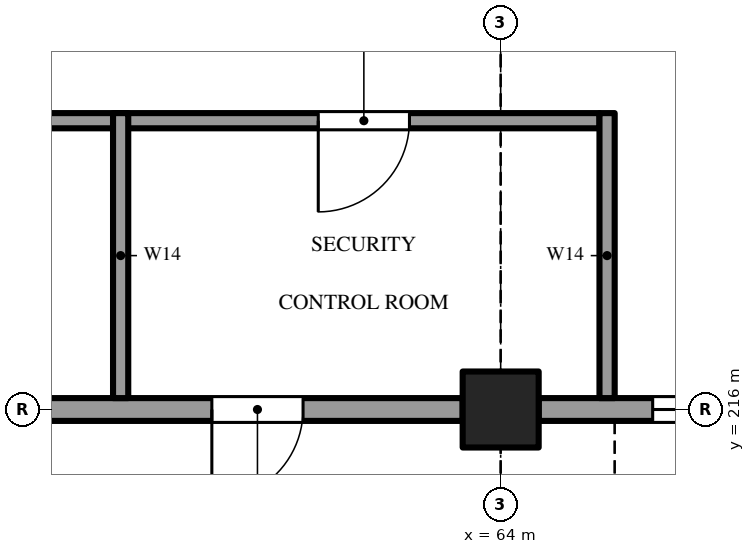
"""IFC4 building model, lengths in metres.
Left out: names, types, materials, properties, quantities, classifications, styles, units other than length and angle.
Written with IfcOpenShell. Run it as: python <this file> out.ifc"""

import sys

from ifc_helpers import new_model, si_unit, direction, frame, frame_2d, origin, origin_2d, place, context, subcontext, project, spatial, rectangle, extrude, element, fill, save


model = new_model("IFC4")
c1 = context("Model", 3, precision=1e-05, world=origin(), true_north=direction((0.0, 1.0)))
c2 = subcontext(c1, "Body", "Model", "MODEL_VIEW")
j1 = project(units=[si_unit("LENGTHUNIT", "METRE"), si_unit("PLANEANGLEUNIT", "RADIAN")], contexts=[c1])
p1 = place(None, origin())
s1 = spatial("IfcSite", under=j1, at=p1, CompositionType="ELEMENT")
p2 = place(p1, origin())
s2 = spatial("IfcBuilding", under=s1, at=p2, CompositionType="ELEMENT")
p3 = place(p2, origin())
s3 = spatial("IfcBuildingStorey", under=s2, at=p3, CompositionType="ELEMENT", Elevation=0.0)
p4 = place(p3, frame((64.0, 216.0, -0.4), z_axis=(0.0, 0.0, 1.0), x_axis=(1.0, 0.0, 0.0)))
e1 = element("IfcColumn", 1, at=p4, inside=s3, PredefinedType="COLUMN", context=c2, shape_type="SweptSolid", body=[
    extrude(rectangle(XDim=1.0, YDim=1.0, at=origin_2d()), origin(), (0.0, 0.0, 1.0), 7.6),
])
p5 = place(p3, frame((46.5, 216.0, 0.0), z_axis=(0.0, 0.0, 1.0), x_axis=(1.0, 0.0, 0.0)))
e2 = element("IfcWall", 2, at=p5, inside=s3, PredefinedType="SOLIDWALL", context=c2, shape_type="SweptSolid", body=[
    extrude(rectangle(XDim=17.0, YDim=0.3, at=frame_2d((8.5, 0.0))), origin(), (0.0, 0.0, 1.0), 6.8),
])
p6 = place(p5, frame((1.0, 0.0, 0.0)))
e3 = element("IfcOpeningElement", 3, at=p6, cuts=e2, PredefinedType="OPENING", context=c2, shape_type="SweptSolid", body=[
    extrude(rectangle(XDim=1.0, YDim=2.2, at=frame_2d((0.5, 1.1))), frame((0.0, 0.16, 0.0), z_axis=(0.0, -1.0, 0.0), x_axis=(1.0, 0.0, 0.0)), (0.0, 0.0, 1.0), 0.32),
])
p7 = place(p5, frame((13.7, 0.0, 0.0)))
e4 = element("IfcOpeningElement", 4, at=p7, cuts=e2, PredefinedType="OPENING", context=c2, shape_type="SweptSolid", body=[
    extrude(rectangle(XDim=1.2, YDim=2.2, at=frame_2d((0.6, 1.1))), frame((0.0, 0.16, 0.0), z_axis=(0.0, -1.0, 0.0), x_axis=(1.0, 0.0, 0.0)), (0.0, 0.0, 1.0), 0.32),
])
p8 = place(p3, frame((64.5, 216.0, 0.0), z_axis=(0.0, 0.0, 1.0), x_axis=(1.0, 0.0, 0.0)))
e5 = element("IfcWall", 5, at=p8, inside=s3, PredefinedType="SOLIDWALL", context=c2, shape_type="SweptSolid", body=[
    extrude(rectangle(XDim=17.0, YDim=0.3, at=frame_2d((8.5, 0.0))), origin(), (0.0, 0.0, 1.0), 6.8),
])
p9 = place(p8, frame((13.4, 0.0, 0.0)))
e6 = element("IfcOpeningElement", 6, at=p9, cuts=e5, PredefinedType="OPENING", context=c2, shape_type="SweptSolid", body=[
    extrude(rectangle(XDim=1.8, YDim=2.4, at=frame_2d((0.9, 1.2))), frame((0.0, 0.16, 0.0), z_axis=(0.0, -1.0, 0.0), x_axis=(1.0, 0.0, 0.0)), (0.0, 0.0, 1.0), 0.32),
])
p10 = place(p8, frame((1.5, 0.0, 0.0)))
e7 = element("IfcOpeningElement", 7, at=p10, cuts=e5, PredefinedType="OPENING", context=c2, shape_type="SweptSolid", body=[
    extrude(rectangle(XDim=5.0, YDim=5.5, at=frame_2d((2.5, 2.75))), frame((0.0, 0.16, 0.0), z_axis=(0.0, -1.0, 0.0), x_axis=(1.0, 0.0, 0.0)), (0.0, 0.0, 1.0), 0.32),
])
p11 = place(p8, frame((9.5, 0.0, 0.0)))
e8 = element("IfcOpeningElement", 8, at=p11, cuts=e5, PredefinedType="OPENING", context=c2, shape_type="SweptSolid", body=[
    extrude(rectangle(XDim=2.4, YDim=2.4, at=frame_2d((1.2, 1.2))), frame((0.0, 0.16, 0.0), z_axis=(0.0, -1.0, 0.0), x_axis=(1.0, 0.0, 0.0)), (0.0, 0.0, 1.0), 0.32),
])
p12 = place(p3, frame((28.175, 219.8, 0.0), z_axis=(0.0, 0.0, 1.0), x_axis=(1.0, 0.0, 0.0)))
e9 = element("IfcWall", 9, at=p12, inside=s3, PredefinedType="SOLIDWALL", context=c2, shape_type="SweptSolid", body=[
    extrude(rectangle(XDim=37.125, YDim=0.2, at=frame_2d((18.562, 0.0))), origin(), (0.0, 0.0, 1.0), 6.8),
])
p13 = place(p12, frame((22.825, 0.0, 0.0)))
e10 = element("IfcOpeningElement", 10, at=p13, cuts=e9, PredefinedType="OPENING", context=c2, shape_type="SweptSolid", body=[
    extrude(rectangle(XDim=1.0, YDim=2.1, at=frame_2d((0.5, 1.05))), frame((0.0, 0.11, 0.0), z_axis=(0.0, -1.0, 0.0), x_axis=(1.0, 0.0, 0.0)), (0.0, 0.0, 1.0), 0.22),
])
p14 = place(p12, frame((27.425, 0.0, 0.0)))
e11 = element("IfcOpeningElement", 11, at=p14, cuts=e9, PredefinedType="OPENING", context=c2, shape_type="SweptSolid", body=[
    extrude(rectangle(XDim=1.2, YDim=2.1, at=frame_2d((0.6, 1.05))), frame((0.0, 0.11, 0.0), z_axis=(0.0, -1.0, 0.0), x_axis=(1.0, 0.0, 0.0)), (0.0, 0.0, 1.0), 0.22),
])
p15 = place(p12, frame((33.425, 0.0, 0.0)))
e12 = element("IfcOpeningElement", 12, at=p15, cuts=e9, PredefinedType="OPENING", context=c2, shape_type="SweptSolid", body=[
    extrude(rectangle(XDim=1.2, YDim=2.1, at=frame_2d((0.6, 1.05))), frame((0.0, 0.11, 0.0), z_axis=(0.0, -1.0, 0.0), x_axis=(1.0, 0.0, 0.0)), (0.0, 0.0, 1.0), 0.22),
])
for number, where, z_axis, x_axis in (
    (13, (59.0, 216.15, 0.0), (0.0, 0.0, 1.0), (0.0, 1.0, 0.0)),
    (14, (65.4, 216.15, 0.0), (0.0, 0.0, 1.0), (0.0, 1.0, 0.0)),
):
    element("IfcWall", number, at=place(p3, frame(where, z_axis=z_axis, x_axis=x_axis)), inside=s3, PredefinedType="SOLIDWALL", context=c2, shape_type="SweptSolid", body=[
        extrude(rectangle(XDim=3.75, YDim=0.2, at=frame_2d((1.875, 0.0))), origin(), (0.0, 0.0, 1.0), 6.8),
    ])
p16 = place(p7, frame((1.2, 0.0, 0.0), z_axis=(0.0, 0.0, 1.0), x_axis=(-1.0, 0.0, 0.0)))
e15 = element("IfcDoor", 15, at=p16, inside=s3, OperationType="SINGLE_SWING_LEFT", PredefinedType="DOOR", context=c2, shape_type="SweptSolid", body=[
    extrude(rectangle(XDim=1.2, YDim=2.2, at=frame_2d((0.6, 1.1))), frame((0.0, 0.025, 0.0), z_axis=(0.0, -1.0, 0.0), x_axis=(1.0, 0.0, 0.0)), (0.0, 0.0, 1.0), 0.05),
])
fill(e4, e15)
p17 = place(p10, origin())
e16 = element("IfcDoor", 16, at=p17, inside=s3, OperationType="ROLLINGUP", PredefinedType="DOOR", context=c2, shape_type="SweptSolid", body=[
    extrude(rectangle(XDim=5.0, YDim=5.5, at=frame_2d((2.5, 2.75))), frame((0.0, 0.025, 0.0), z_axis=(0.0, -1.0, 0.0), x_axis=(1.0, 0.0, 0.0)), (0.0, 0.0, 1.0), 0.05),
])
fill(e7, e16)
p18 = place(p15, frame((1.2, 0.0, 0.0), z_axis=(0.0, 0.0, 1.0), x_axis=(-1.0, 0.0, 0.0)))
e17 = element("IfcDoor", 17, at=p18, inside=s3, OperationType="SINGLE_SWING_RIGHT", PredefinedType="DOOR", context=c2, shape_type="SweptSolid", body=[
    extrude(rectangle(XDim=1.2, YDim=2.1, at=frame_2d((0.6, 1.05))), frame((0.0, 0.025, 0.0), z_axis=(0.0, -1.0, 0.0), x_axis=(1.0, 0.0, 0.0)), (0.0, 0.0, 1.0), 0.05),
])
fill(e12, e17)
save(model, sys.argv[1])
